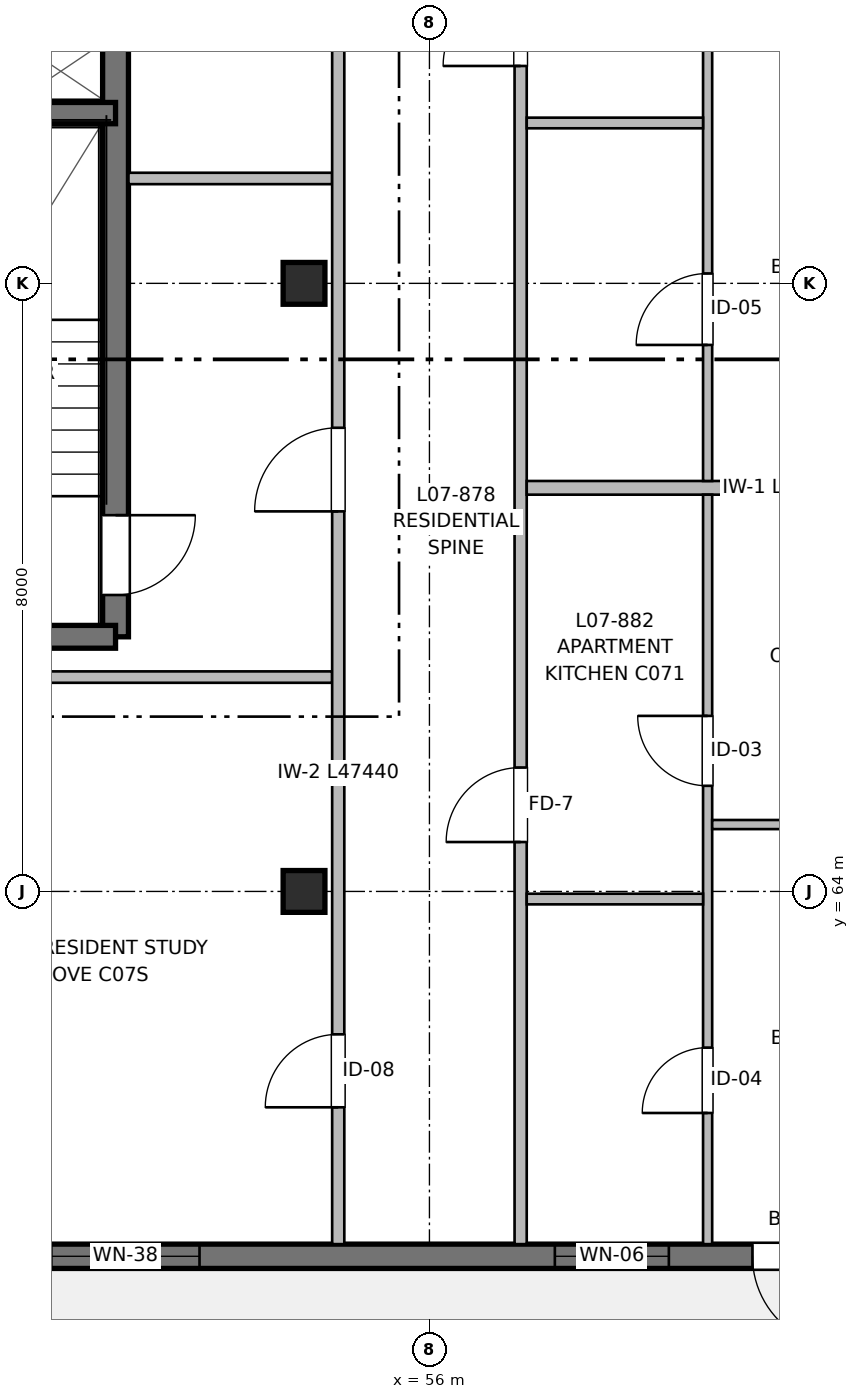
"""IFC4 building model, lengths in metres.
Left out: names, types, materials, properties, quantities, classifications, styles, units other than length and angle.
Written with IfcOpenShell. Run it as: python <this file> out.ifc"""

import sys

from ifc_helpers import new_model, si_unit, direction, frame, frame_2d, origin, origin_2d, place, context, subcontext, project, spatial, rectangle, extrude, element, fill, save


model = new_model("IFC4")
c1 = context("Model", 3, precision=1e-05, world=origin(), true_north=direction((0.0, 1.0)))
c2 = subcontext(c1, "Body", "Model", "MODEL_VIEW")
j1 = project(units=[si_unit("LENGTHUNIT", "METRE"), si_unit("PLANEANGLEUNIT", "RADIAN")], contexts=[c1])
p1 = place(None, origin())
s1 = spatial("IfcSite", under=j1, at=p1, CompositionType="ELEMENT")
p2 = place(p1, origin())
s2 = spatial("IfcBuilding", under=s1, at=p2, CompositionType="ELEMENT")
p3 = place(p2, frame((0.0, 0.0, 23.36)))
s3 = spatial("IfcBuildingStorey", under=s2, at=p3, CompositionType="ELEMENT", Elevation=23.36)
for number, where, z_axis, x_axis in (
    (1, (54.35, 64.0, 0.0), (0.0, 0.0, 1.0), (1.0, 0.0, 0.0)),
    (2, (54.35, 72.0, 0.0), (0.0, 0.0, 1.0), (1.0, 0.0, 0.0)),
):
    element("IfcColumn", number, at=place(p3, frame(where, z_axis=z_axis, x_axis=x_axis)), inside=s3, PredefinedType="COLUMN", context=c2, shape_type="SweptSolid", body=[
        extrude(rectangle(XDim=0.55, YDim=0.55, at=origin_2d()), origin(), (0.0, 0.0, 1.0), 3.2),
    ])
p4 = place(p3, frame((51.87, 79.8, 0.0), z_axis=(0.0, 0.0, 1.0), x_axis=(0.0, -1.0, 0.0)))
e3 = element("IfcWall", 3, at=p4, inside=s3, PredefinedType="SHEAR", context=c2, shape_type="SweptSolid", body=[
    extrude(rectangle(XDim=12.45, YDim=0.34, at=frame_2d((6.225, 0.0))), origin(), (0.0, 0.0, 1.0), 3.2),
])
p5 = place(p4, frame((10.85, 0.0, 0.0)))
e4 = element("IfcOpeningElement", 4, at=p5, cuts=e3, PredefinedType="OPENING", context=c2, shape_type="SweptSolid", body=[
    extrude(rectangle(XDim=1.05, YDim=2.15, at=frame_2d((0.525, 1.075))), frame((0.0, 0.18, 0.0), z_axis=(0.0, -1.0, 0.0), x_axis=(1.0, 0.0, 0.0)), (0.0, 0.0, 1.0), 0.36),
])
p6 = place(p3, frame((51.87, 67.35, 0.0), z_axis=(0.0, 0.0, 1.0), x_axis=(-1.0, 0.0, 0.0)))
e5 = element("IfcWall", 5, at=p6, inside=s3, PredefinedType="SHEAR", context=c2, shape_type="SweptSolid", body=[
    extrude(rectangle(XDim=3.41, YDim=0.3, at=frame_2d((1.705, 0.0))), origin(), (0.0, 0.0, 1.0), 3.2),
])
p7 = place(p3, frame((48.46, 74.24, 0.0), z_axis=(0.0, 0.0, 1.0), x_axis=(1.0, 0.0, 0.0)))
e6 = element("IfcWall", 6, at=p7, inside=s3, PredefinedType="SHEAR", context=c2, shape_type="SweptSolid", body=[
    extrude(rectangle(XDim=3.41, YDim=0.28, at=frame_2d((1.705, 0.0))), origin(), (0.0, 0.0, 1.0), 3.2),
])
p8 = place(p3, frame((64.0, 59.2, 0.0), z_axis=(0.0, 0.0, 1.0), x_axis=(-1.0, 0.0, 0.0)))
e7 = element("IfcWall", 7, at=p8, inside=s3, PredefinedType="SHEAR", context=c2, shape_type="SweptSolid", body=[
    extrude(rectangle(XDim=16.0, YDim=0.32, at=frame_2d((8.0, 0.0))), origin(), (0.0, 0.0, 1.0), 2.98),
])
p9 = place(p8, frame((2.55, 0.0, 0.0)))
e8 = element("IfcOpeningElement", 8, at=p9, cuts=e7, PredefinedType="OPENING", context=c2, shape_type="SweptSolid", body=[
    extrude(rectangle(XDim=1.2, YDim=2.2, at=frame_2d((0.6, 1.1))), frame((0.0, 0.17, 0.0), z_axis=(0.0, -1.0, 0.0), x_axis=(1.0, 0.0, 0.0)), (0.0, 0.0, 1.0), 0.34),
])
p10 = place(p8, frame((4.85, 0.0, 0.82)))
e9 = element("IfcOpeningElement", 9, at=p10, cuts=e7, PredefinedType="OPENING", context=c2, shape_type="SweptSolid", body=[
    extrude(rectangle(XDim=1.5, YDim=1.4, at=frame_2d((0.75, 0.7))), frame((0.0, 0.17, 0.0), z_axis=(0.0, -1.0, 0.0), x_axis=(1.0, 0.0, 0.0)), (0.0, 0.0, 1.0), 0.34),
])
p11 = place(p8, frame((11.025, 0.0, 0.72)))
e10 = element("IfcOpeningElement", 10, at=p11, cuts=e7, PredefinedType="OPENING", context=c2, shape_type="SweptSolid", body=[
    extrude(rectangle(XDim=1.95, YDim=1.5, at=frame_2d((0.975, 0.75))), frame((0.0, 0.17, 0.0), z_axis=(0.0, -1.0, 0.0), x_axis=(1.0, 0.0, 0.0)), (0.0, 0.0, 1.0), 0.34),
])
p12 = place(p3, frame((48.13, 66.82, 0.0), z_axis=(0.0, 0.0, 1.0), x_axis=(1.0, 0.0, 0.0)))
e11 = element("IfcWall", 11, at=p12, inside=s3, PredefinedType="PARTITIONING", context=c2, shape_type="SweptSolid", body=[
    extrude(rectangle(XDim=6.59, YDim=0.15, at=frame_2d((3.295, 0.0))), origin(), (0.0, 0.0, 1.0), 2.935),
])
p13 = place(p3, frame((52.04, 73.38, 0.0), z_axis=(0.0, 0.0, 1.0), x_axis=(1.0, 0.0, 0.0)))
e12 = element("IfcWall", 12, at=p13, inside=s3, PredefinedType="PARTITIONING", context=c2, shape_type="SweptSolid", body=[
    extrude(rectangle(XDim=2.68, YDim=0.15, at=frame_2d((1.34, 0.0))), origin(), (0.0, 0.0, 1.0), 2.935),
])
p14 = place(p3, frame((54.8, 59.36, 0.0), z_axis=(0.0, 0.0, 1.0), x_axis=(0.0, 1.0, 0.0)))
e13 = element("IfcWall", 13, at=p14, inside=s3, PredefinedType="PARTITIONING", context=c2, shape_type="SweptSolid", body=[
    extrude(rectangle(XDim=47.44, YDim=0.16, at=frame_2d((23.72, 0.0))), origin(), (0.0, 0.0, 1.0), 2.935),
])
p15 = place(p14, frame((9.64, 0.0, 0.0)))
e14 = element("IfcOpeningElement", 14, at=p15, cuts=e13, PredefinedType="OPENING", context=c2, shape_type="SweptSolid", body=[
    extrude(rectangle(XDim=1.1, YDim=2.15, at=frame_2d((0.55, 1.075))), frame((0.0, 0.09, 0.0), z_axis=(0.0, -1.0, 0.0), x_axis=(1.0, 0.0, 0.0)), (0.0, 0.0, 1.0), 0.18),
])
p16 = place(p14, frame((16.04, 0.0, 0.0)))
e15 = element("IfcOpeningElement", 15, at=p16, cuts=e13, PredefinedType="OPENING", context=c2, shape_type="SweptSolid", body=[
    extrude(rectangle(XDim=1.6, YDim=2.15, at=frame_2d((0.8, 1.075))), frame((0.0, 0.09, 0.0), z_axis=(0.0, -1.0, 0.0), x_axis=(1.0, 0.0, 0.0)), (0.0, 0.0, 1.0), 0.18),
])
p17 = place(p14, frame((1.8, 0.0, 0.0)))
e16 = element("IfcOpeningElement", 16, at=p17, cuts=e13, PredefinedType="OPENING", context=c2, shape_type="SweptSolid", body=[
    extrude(rectangle(XDim=0.96, YDim=2.15, at=frame_2d((0.48, 1.075))), frame((0.0, 0.09, 0.0), z_axis=(0.0, -1.0, 0.0), x_axis=(1.0, 0.0, 0.0)), (0.0, 0.0, 1.0), 0.18),
])
p18 = place(p14, frame((29.545, 0.0, 0.0)))
e17 = element("IfcOpeningElement", 17, at=p18, cuts=e13, PredefinedType="OPENING", context=c2, shape_type="SweptSolid", body=[
    extrude(rectangle(XDim=0.98, YDim=2.15, at=frame_2d((0.49, 1.075))), frame((0.0, 0.09, 0.0), z_axis=(0.0, -1.0, 0.0), x_axis=(1.0, 0.0, 0.0)), (0.0, 0.0, 1.0), 0.18),
])
p19 = place(p14, frame((37.755, 0.0, 0.0)))
e18 = element("IfcOpeningElement", 18, at=p19, cuts=e13, PredefinedType="OPENING", context=c2, shape_type="SweptSolid", body=[
    extrude(rectangle(XDim=0.98, YDim=2.15, at=frame_2d((0.49, 1.075))), frame((0.0, 0.09, 0.0), z_axis=(0.0, -1.0, 0.0), x_axis=(1.0, 0.0, 0.0)), (0.0, 0.0, 1.0), 0.18),
])
p20 = place(p3, frame((57.2, 59.36, 0.0), z_axis=(0.0, 0.0, 1.0), x_axis=(0.0, 1.0, 0.0)))
e19 = element("IfcWall", 19, at=p20, inside=s3, PredefinedType="PARTITIONING", context=c2, shape_type="SweptSolid", body=[
    extrude(rectangle(XDim=47.44, YDim=0.16, at=frame_2d((23.72, 0.0))), origin(), (0.0, 0.0, 1.0), 2.935),
])
p21 = place(p20, frame((5.29, 0.0, 0.0)))
e20 = element("IfcOpeningElement", 20, at=p21, cuts=e19, PredefinedType="OPENING", context=c2, shape_type="SweptSolid", body=[
    extrude(rectangle(XDim=0.98, YDim=2.15, at=frame_2d((0.49, 1.075))), frame((0.0, 0.09, 0.0), z_axis=(0.0, -1.0, 0.0), x_axis=(1.0, 0.0, 0.0)), (0.0, 0.0, 1.0), 0.18),
])
p22 = place(p20, frame((15.5, 0.0, 0.0)))
e21 = element("IfcOpeningElement", 21, at=p22, cuts=e19, PredefinedType="OPENING", context=c2, shape_type="SweptSolid", body=[
    extrude(rectangle(XDim=1.02, YDim=2.15, at=frame_2d((0.51, 1.075))), frame((0.0, 0.09, 0.0), z_axis=(0.0, -1.0, 0.0), x_axis=(1.0, 0.0, 0.0)), (0.0, 0.0, 1.0), 0.18),
])
p23 = place(p20, frame((26.78, 0.0, 0.0)))
e22 = element("IfcOpeningElement", 22, at=p23, cuts=e19, PredefinedType="OPENING", context=c2, shape_type="SweptSolid", body=[
    extrude(rectangle(XDim=0.98, YDim=2.15, at=frame_2d((0.49, 1.075))), frame((0.0, 0.09, 0.0), z_axis=(0.0, -1.0, 0.0), x_axis=(1.0, 0.0, 0.0)), (0.0, 0.0, 1.0), 0.18),
])
p24 = place(p20, frame((40.23, 0.0, 0.0)))
e23 = element("IfcOpeningElement", 23, at=p24, cuts=e19, PredefinedType="OPENING", context=c2, shape_type="SweptSolid", body=[
    extrude(rectangle(XDim=0.98, YDim=2.15, at=frame_2d((0.49, 1.075))), frame((0.0, 0.09, 0.0), z_axis=(0.0, -1.0, 0.0), x_axis=(1.0, 0.0, 0.0)), (0.0, 0.0, 1.0), 0.18),
])
p25 = place(p3, frame((57.28, 69.31, 0.0), z_axis=(0.0, 0.0, 1.0), x_axis=(1.0, 0.0, 0.0)))
e24 = element("IfcWall", 24, at=p25, inside=s3, PredefinedType="PARTITIONING", context=c2, shape_type="SweptSolid", body=[
    extrude(rectangle(XDim=6.59, YDim=0.18, at=frame_2d((3.295, 0.0))), origin(), (0.0, 0.0, 1.0), 2.935),
])
p26 = place(p3, frame((59.66, 59.36, 0.0), z_axis=(0.0, 0.0, 1.0), x_axis=(0.0, 1.0, 0.0)))
e25 = element("IfcWall", 25, at=p26, inside=s3, PredefinedType="PARTITIONING", context=c2, shape_type="SweptSolid", body=[
    extrude(rectangle(XDim=9.86, YDim=0.12, at=frame_2d((4.93, 0.0))), origin(), (0.0, 0.0, 1.0), 2.935),
])
p27 = place(p26, frame((1.725, 0.0, 0.0)))
e26 = element("IfcOpeningElement", 26, at=p27, cuts=e25, PredefinedType="OPENING", context=c2, shape_type="SweptSolid", body=[
    extrude(rectangle(XDim=0.86, YDim=2.1, at=frame_2d((0.43, 1.05))), frame((0.0, 0.07, 0.0), z_axis=(0.0, -1.0, 0.0), x_axis=(1.0, 0.0, 0.0)), (0.0, 0.0, 1.0), 0.14),
])
p28 = place(p26, frame((6.03, 0.0, 0.0)))
e27 = element("IfcOpeningElement", 27, at=p28, cuts=e25, PredefinedType="OPENING", context=c2, shape_type="SweptSolid", body=[
    extrude(rectangle(XDim=0.92, YDim=2.1, at=frame_2d((0.46, 1.05))), frame((0.0, 0.07, 0.0), z_axis=(0.0, -1.0, 0.0), x_axis=(1.0, 0.0, 0.0)), (0.0, 0.0, 1.0), 0.14),
])
p29 = place(p3, frame((57.28, 63.9, 0.0), z_axis=(0.0, 0.0, 1.0), x_axis=(1.0, 0.0, 0.0)))
e28 = element("IfcWall", 28, at=p29, inside=s3, PredefinedType="PARTITIONING", context=c2, shape_type="SweptSolid", body=[
    extrude(rectangle(XDim=2.32, YDim=0.14, at=frame_2d((1.16, 0.0))), origin(), (0.0, 0.0, 1.0), 2.53),
])
p30 = place(p3, frame((59.72, 64.88, 0.0), z_axis=(0.0, 0.0, 1.0), x_axis=(1.0, 0.0, 0.0)))
e29 = element("IfcWall", 29, at=p30, inside=s3, PredefinedType="PARTITIONING", context=c2, shape_type="SweptSolid", body=[
    extrude(rectangle(XDim=4.15, YDim=0.12, at=frame_2d((2.075, 0.0))), origin(), (0.0, 0.0, 1.0), 2.935),
])
p31 = place(p30, frame((1.625, 0.0, 0.0)))
e30 = element("IfcOpeningElement", 30, at=p31, cuts=e29, PredefinedType="OPENING", context=c2, shape_type="SweptSolid", body=[
    extrude(rectangle(XDim=0.9, YDim=2.1, at=frame_2d((0.45, 1.05))), frame((0.0, 0.07, 0.0), z_axis=(0.0, -1.0, 0.0), x_axis=(1.0, 0.0, 0.0)), (0.0, 0.0, 1.0), 0.14),
])
p32 = place(p3, frame((59.66, 69.4, 0.0), z_axis=(0.0, 0.0, 1.0), x_axis=(0.0, 1.0, 0.0)))
e31 = element("IfcWall", 31, at=p32, inside=s3, PredefinedType="PARTITIONING", context=c2, shape_type="SweptSolid", body=[
    extrude(rectangle(XDim=10.23, YDim=0.12, at=frame_2d((5.115, 0.0))), origin(), (0.0, 0.0, 1.0), 2.935),
])
p33 = place(p32, frame((1.79, 0.0, 0.0)))
e32 = element("IfcOpeningElement", 32, at=p33, cuts=e31, PredefinedType="OPENING", context=c2, shape_type="SweptSolid", body=[
    extrude(rectangle(XDim=0.94, YDim=2.1, at=frame_2d((0.47, 1.05))), frame((0.0, 0.07, 0.0), z_axis=(0.0, -1.0, 0.0), x_axis=(1.0, 0.0, 0.0)), (0.0, 0.0, 1.0), 0.14),
])
p34 = place(p32, frame((6.256, 0.0, 0.0)))
e33 = element("IfcOpeningElement", 33, at=p34, cuts=e31, PredefinedType="OPENING", context=c2, shape_type="SweptSolid", body=[
    extrude(rectangle(XDim=0.92, YDim=2.1, at=frame_2d((0.46, 1.05))), frame((0.0, 0.07, 0.0), z_axis=(0.0, -1.0, 0.0), x_axis=(1.0, 0.0, 0.0)), (0.0, 0.0, 1.0), 0.14),
])
p35 = place(p3, frame((57.28, 74.11, 0.0), z_axis=(0.0, 0.0, 1.0), x_axis=(1.0, 0.0, 0.0)))
e34 = element("IfcWall", 34, at=p35, inside=s3, PredefinedType="PARTITIONING", context=c2, shape_type="SweptSolid", body=[
    extrude(rectangle(XDim=2.32, YDim=0.14, at=frame_2d((1.16, 0.0))), origin(), (0.0, 0.0, 1.0), 2.935),
])
p36 = place(p5, origin())
e35 = element("IfcDoor", 35, at=p36, inside=s3, OperationType="SINGLE_SWING_LEFT", PredefinedType="DOOR", context=c2, shape_type="SweptSolid", body=[
    extrude(rectangle(XDim=1.05, YDim=2.15, at=frame_2d((0.525, 1.075))), frame((0.0, 0.025, 0.0), z_axis=(0.0, -1.0, 0.0), x_axis=(1.0, 0.0, 0.0)), (0.0, 0.0, 1.0), 0.05),
])
fill(e4, e35)
p37 = place(p9, origin())
e36 = element("IfcDoor", 36, at=p37, inside=s3, OperationType="SINGLE_SWING_LEFT", PredefinedType="DOOR", context=c2, shape_type="SweptSolid", body=[
    extrude(rectangle(XDim=1.2, YDim=2.2, at=frame_2d((0.6, 1.1))), frame((0.0, 0.025, 0.0), z_axis=(0.0, -1.0, 0.0), x_axis=(1.0, 0.0, 0.0)), (0.0, 0.0, 1.0), 0.05),
])
fill(e8, e36)
p38 = place(p10, origin())
e37 = element("IfcWindow", 37, at=p38, inside=s3, PartitioningType="SINGLE_PANEL", PredefinedType="WINDOW", context=c2, shape_type="SweptSolid", body=[
    extrude(rectangle(XDim=1.5, YDim=1.4, at=frame_2d((0.75, 0.7))), frame((0.0, 0.03, 0.0), z_axis=(0.0, -1.0, 0.0), x_axis=(1.0, 0.0, 0.0)), (0.0, 0.0, 1.0), 0.06),
])
fill(e9, e37)
p39 = place(p11, origin())
e38 = element("IfcWindow", 38, at=p39, inside=s3, PartitioningType="SINGLE_PANEL", PredefinedType="WINDOW", context=c2, shape_type="SweptSolid", body=[
    extrude(rectangle(XDim=1.95, YDim=1.5, at=frame_2d((0.975, 0.75))), frame((0.0, 0.03, 0.0), z_axis=(0.0, -1.0, 0.0), x_axis=(1.0, 0.0, 0.0)), (0.0, 0.0, 1.0), 0.06),
])
fill(e10, e38)
p40 = place(p15, origin())
e39 = element("IfcDoor", 39, at=p40, inside=s3, OperationType="SINGLE_SWING_LEFT", PredefinedType="DOOR", context=c2, shape_type="SweptSolid", body=[
    extrude(rectangle(XDim=1.1, YDim=2.15, at=frame_2d((0.55, 1.075))), frame((0.0, 0.025, 0.0), z_axis=(0.0, -1.0, 0.0), x_axis=(1.0, 0.0, 0.0)), (0.0, 0.0, 1.0), 0.05),
])
fill(e14, e39)
p41 = place(p27, origin())
e40 = element("IfcDoor", 40, at=p41, inside=s3, OperationType="SINGLE_SWING_LEFT", PredefinedType="DOOR", context=c2, shape_type="SweptSolid", body=[
    extrude(rectangle(XDim=0.86, YDim=2.1, at=frame_2d((0.43, 1.05))), frame((0.0, 0.025, 0.0), z_axis=(0.0, -1.0, 0.0), x_axis=(1.0, 0.0, 0.0)), (0.0, 0.0, 1.0), 0.05),
])
fill(e26, e40)
p42 = place(p28, origin())
e41 = element("IfcDoor", 41, at=p42, inside=s3, OperationType="SINGLE_SWING_RIGHT", PredefinedType="DOOR", context=c2, shape_type="SweptSolid", body=[
    extrude(rectangle(XDim=0.92, YDim=2.1, at=frame_2d((0.46, 1.05))), frame((0.0, 0.025, 0.0), z_axis=(0.0, -1.0, 0.0), x_axis=(1.0, 0.0, 0.0)), (0.0, 0.0, 1.0), 0.05),
])
fill(e27, e41)
p43 = place(p21, origin())
e42 = element("IfcDoor", 42, at=p43, inside=s3, OperationType="SINGLE_SWING_LEFT", PredefinedType="DOOR", context=c2, shape_type="SweptSolid", body=[
    extrude(rectangle(XDim=0.98, YDim=2.15, at=frame_2d((0.49, 1.075))), frame((0.0, 0.025, 0.0), z_axis=(0.0, -1.0, 0.0), x_axis=(1.0, 0.0, 0.0)), (0.0, 0.0, 1.0), 0.05),
])
fill(e20, e42)
p44 = place(p33, origin())
e43 = element("IfcDoor", 43, at=p44, inside=s3, OperationType="SINGLE_SWING_LEFT", PredefinedType="DOOR", context=c2, shape_type="SweptSolid", body=[
    extrude(rectangle(XDim=0.94, YDim=2.1, at=frame_2d((0.47, 1.05))), frame((0.0, 0.025, 0.0), z_axis=(0.0, -1.0, 0.0), x_axis=(1.0, 0.0, 0.0)), (0.0, 0.0, 1.0), 0.05),
])
fill(e32, e43)
p45 = place(p22, origin())
e44 = element("IfcDoor", 44, at=p45, inside=s3, OperationType="SINGLE_SWING_LEFT", PredefinedType="DOOR", context=c2, shape_type="SweptSolid", body=[
    extrude(rectangle(XDim=1.02, YDim=2.15, at=frame_2d((0.51, 1.075))), frame((0.0, 0.025, 0.0), z_axis=(0.0, -1.0, 0.0), x_axis=(1.0, 0.0, 0.0)), (0.0, 0.0, 1.0), 0.05),
])
fill(e21, e44)
p46 = place(p17, origin())
e45 = element("IfcDoor", 45, at=p46, inside=s3, OperationType="SINGLE_SWING_LEFT", PredefinedType="DOOR", context=c2, shape_type="SweptSolid", body=[
    extrude(rectangle(XDim=0.96, YDim=2.15, at=frame_2d((0.48, 1.075))), frame((0.0, 0.025, 0.0), z_axis=(0.0, -1.0, 0.0), x_axis=(1.0, 0.0, 0.0)), (0.0, 0.0, 1.0), 0.05),
])
fill(e16, e45)
save(model, sys.argv[1])
